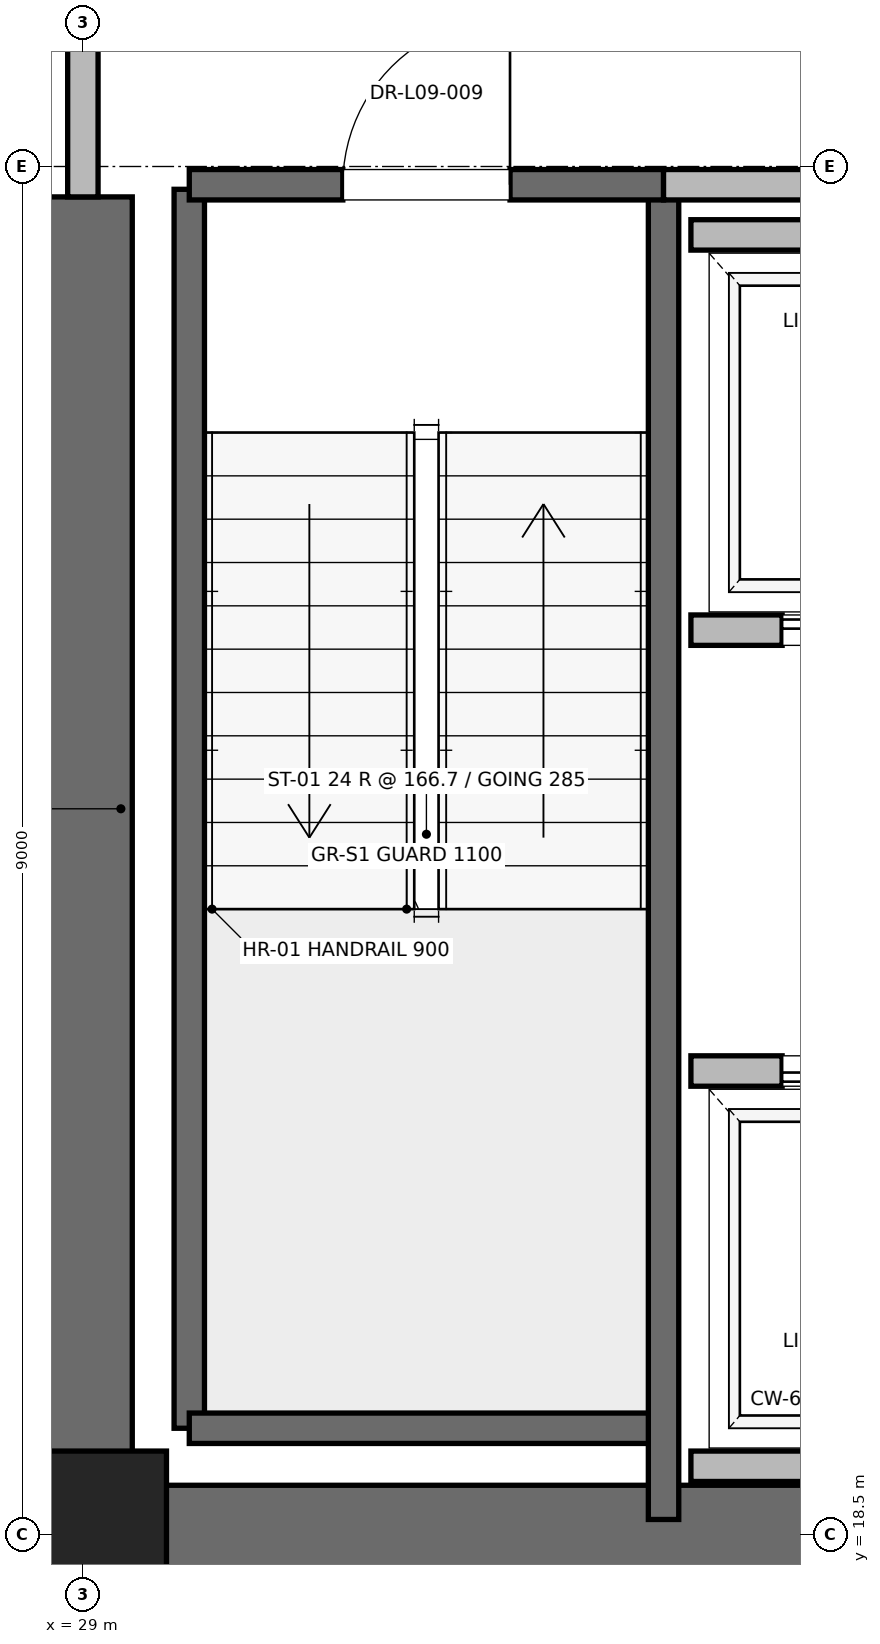
"""IFC4 building model, lengths in metres.
Left out: names, types, materials, properties, quantities, classifications, styles, units other than length and angle.
Written with IfcOpenShell. Run it as: python <this file> out.ifc"""

import sys

from ifc_helpers import new_model, si_unit, direction, frame, frame_2d, origin, origin_2d, place, context, subcontext, project, spatial, rectangle, extrude, element, fill, save


model = new_model("IFC4")
c1 = context("Model", 3, precision=1e-05, world=origin(), true_north=direction((0.0, 1.0)))
c2 = subcontext(c1, "Body", "Model", "MODEL_VIEW")
j1 = project(units=[si_unit("LENGTHUNIT", "METRE"), si_unit("PLANEANGLEUNIT", "RADIAN")], contexts=[c1])
p1 = place(None, origin())
s1 = spatial("IfcSite", under=j1, at=p1, CompositionType="ELEMENT")
p2 = place(p1, origin())
s2 = spatial("IfcBuilding", under=s1, at=p2, CompositionType="ELEMENT")
p3 = place(p2, frame((0.0, 0.0, 43.6)))
s3 = spatial("IfcBuildingStorey", under=s2, at=p3, CompositionType="ELEMENT", Elevation=43.6)
p4 = place(p3, frame((29.0, 18.5, 0.0), z_axis=(0.0, 0.0, 1.0), x_axis=(1.0, 0.0, 0.0)))
e1 = element("IfcColumn", 1, at=p4, inside=s3, PredefinedType="PILASTER", context=c2, shape_type="SweptSolid", body=[
    extrude(rectangle(XDim=1.1, YDim=1.1, at=origin_2d()), origin(), (0.0, 0.0, 1.0), 4.0),
])
p5 = place(p3, frame((29.0, 18.5, 0.0), z_axis=(0.0, 0.0, 1.0), x_axis=(1.0, 0.0, 0.0)))
e2 = element("IfcWall", 2, at=p5, inside=s3, PredefinedType="SHEAR", context=c2, shape_type="SweptSolid", body=[
    extrude(rectangle(XDim=9.2, YDim=0.65, at=frame_2d((4.6, 0.0))), origin(), (0.0, 0.0, 1.0), 3.76),
])
p6 = place(p3, frame((29.0, 18.5, 0.0), z_axis=(0.0, 0.0, 1.0), x_axis=(0.0, 1.0, 0.0)))
e3 = element("IfcWall", 3, at=p6, inside=s3, PredefinedType="SHEAR", context=c2, shape_type="SweptSolid", body=[
    extrude(rectangle(XDim=8.8, YDim=0.65, at=frame_2d((4.4, 0.0))), origin(), (0.0, 0.0, 1.0), 3.76),
])
p7 = place(p3, frame((29.7, 19.2, 0.0), z_axis=(0.0, 0.0, 1.0), x_axis=(0.0, 1.0, 0.0)))
e4 = element("IfcWall", 4, at=p7, inside=s3, PredefinedType="SOLIDWALL", context=c2, shape_type="SweptSolid", body=[
    extrude(rectangle(XDim=8.15, YDim=0.2, at=frame_2d((4.075, 0.0))), origin(), (0.0, 0.0, 1.0), 3.76),
])
p8 = place(p3, frame((29.7, 19.2, 0.0), z_axis=(0.0, 0.0, 1.0), x_axis=(1.0, 0.0, 0.0)))
e5 = element("IfcWall", 5, at=p8, inside=s3, PredefinedType="SOLIDWALL", context=c2, shape_type="SweptSolid", body=[
    extrude(rectangle(XDim=3.12, YDim=0.2, at=frame_2d((1.56, 0.0))), origin(), (0.0, 0.0, 1.0), 3.76),
])
p9 = place(p3, frame((32.82, 18.6, 0.0), z_axis=(0.0, 0.0, 1.0), x_axis=(0.0, 1.0, 0.0)))
e6 = element("IfcWall", 6, at=p9, inside=s3, PredefinedType="SOLIDWALL", context=c2, shape_type="SweptSolid", body=[
    extrude(rectangle(XDim=8.78, YDim=0.2, at=frame_2d((4.39, 0.0))), origin(), (0.0, 0.0, 1.0), 3.76),
])
p10 = place(p3, frame((29.7, 27.38, 0.0), z_axis=(0.0, 0.0, 1.0), x_axis=(1.0, 0.0, 0.0)))
e7 = element("IfcWall", 7, at=p10, inside=s3, PredefinedType="SOLIDWALL", context=c2, shape_type="SweptSolid", body=[
    extrude(rectangle(XDim=3.12, YDim=0.2, at=frame_2d((1.56, 0.0))), origin(), (0.0, 0.0, 1.0), 3.76),
])
p11 = place(p10, frame((1.01, 0.0, 0.0)))
e8 = element("IfcOpeningElement", 8, at=p11, cuts=e7, PredefinedType="OPENING", context=c2, shape_type="SweptSolid", body=[
    extrude(rectangle(XDim=1.1, YDim=2.15, at=frame_2d((0.55, 1.075))), frame((0.0, 0.1, 0.0), z_axis=(0.0, -1.0, 0.0), x_axis=(1.0, 0.0, 0.0)), (0.0, 0.0, 1.0), 0.2),
])
p12 = place(p3, frame((29.0, 27.3, 0.0), z_axis=(0.0, 0.0, 1.0), x_axis=(0.0, 1.0, 0.0)))
e9 = element("IfcWall", 9, at=p12, inside=s3, PredefinedType="PARTITIONING", context=c2, shape_type="SweptSolid", body=[
    extrude(rectangle(XDim=3.4, YDim=0.2, at=frame_2d((1.7, 0.0))), origin(), (0.0, 0.0, 1.0), 2.54),
])
p13 = place(p12, frame((1.125, 0.0, 0.0)))
e10 = element("IfcOpeningElement", 10, at=p13, cuts=e9, PredefinedType="OPENING", context=c2, shape_type="SweptSolid", body=[
    extrude(rectangle(XDim=1.15, YDim=2.2, at=frame_2d((0.575, 1.1))), frame((0.0, 0.1, 0.0), z_axis=(0.0, -1.0, 0.0), x_axis=(1.0, 0.0, 0.0)), (0.0, 0.0, 1.0), 0.2),
])
p14 = place(p3, frame((32.82, 27.38, 0.0), z_axis=(0.0, 0.0, 1.0), x_axis=(1.0, 0.0, 0.0)))
e11 = element("IfcWall", 11, at=p14, inside=s3, PredefinedType="PARTITIONING", context=c2, shape_type="SweptSolid", body=[
    extrude(rectangle(XDim=5.62, YDim=0.2, at=frame_2d((2.81, 0.0))), origin(), (0.0, 0.0, 1.0), 3.76),
])
p15 = place(p3, frame((33.0, 18.95, 0.0), z_axis=(0.0, 0.0, 1.0), x_axis=(1.0, 0.0, 0.0)))
e12 = element("IfcWall", 12, at=p15, inside=s3, PredefinedType="SOLIDWALL", context=c2, shape_type="SweptSolid", body=[
    extrude(rectangle(XDim=2.3, YDim=0.2, at=frame_2d((1.15, 0.0))), origin(), (0.0, 0.0, 1.0), 3.76),
])
p16 = place(p3, frame((35.3, 21.55, 0.0), z_axis=(0.0, 0.0, 1.0), x_axis=(-1.0, 0.0, 0.0)))
e13 = element("IfcWall", 13, at=p16, inside=s3, PredefinedType="SOLIDWALL", context=c2, shape_type="SweptSolid", body=[
    extrude(rectangle(XDim=2.3, YDim=0.2, at=frame_2d((1.15, 0.0))), origin(), (0.0, 0.0, 1.0), 3.76),
])
p17 = place(p16, frame((0.6, 0.0, 0.0)))
e14 = element("IfcOpeningElement", 14, at=p17, cuts=e13, PredefinedType="OPENING", context=c2, shape_type="SweptSolid", body=[
    extrude(rectangle(XDim=1.1, YDim=2.2, at=frame_2d((0.55, 1.1))), frame((0.0, 0.1, 0.0), z_axis=(0.0, -1.0, 0.0), x_axis=(1.0, 0.0, 0.0)), (0.0, 0.0, 1.0), 0.2),
])
p18 = place(p3, frame((33.0, 24.45, 0.0), z_axis=(0.0, 0.0, 1.0), x_axis=(1.0, 0.0, 0.0)))
e15 = element("IfcWall", 15, at=p18, inside=s3, PredefinedType="SOLIDWALL", context=c2, shape_type="SweptSolid", body=[
    extrude(rectangle(XDim=2.3, YDim=0.2, at=frame_2d((1.15, 0.0))), origin(), (0.0, 0.0, 1.0), 3.76),
])
p19 = place(p18, frame((0.6, 0.0, 0.0)))
e16 = element("IfcOpeningElement", 16, at=p19, cuts=e15, PredefinedType="OPENING", context=c2, shape_type="SweptSolid", body=[
    extrude(rectangle(XDim=1.1, YDim=2.2, at=frame_2d((0.55, 1.1))), frame((0.0, 0.1, 0.0), z_axis=(0.0, -1.0, 0.0), x_axis=(1.0, 0.0, 0.0)), (0.0, 0.0, 1.0), 0.2),
])
p20 = place(p3, frame((35.3, 27.05, 0.0), z_axis=(0.0, 0.0, 1.0), x_axis=(-1.0, 0.0, 0.0)))
e17 = element("IfcWall", 17, at=p20, inside=s3, PredefinedType="SOLIDWALL", context=c2, shape_type="SweptSolid", body=[
    extrude(rectangle(XDim=2.3, YDim=0.2, at=frame_2d((1.15, 0.0))), origin(), (0.0, 0.0, 1.0), 3.76),
])
p21 = place(p11, origin())
e18 = element("IfcDoor", 18, at=p21, inside=s3, OperationType="SINGLE_SWING_RIGHT", PredefinedType="DOOR", context=c2, shape_type="SweptSolid", body=[
    extrude(rectangle(XDim=1.1, YDim=2.15, at=frame_2d((0.55, 1.075))), frame((0.0, 0.025, 0.0), z_axis=(0.0, -1.0, 0.0), x_axis=(1.0, 0.0, 0.0)), (0.0, 0.0, 1.0), 0.05),
])
fill(e8, e18)
p22 = place(p17, origin())
e19 = element("IfcDoor", 19, at=p22, inside=s3, OperationType="SLIDING_TO_RIGHT", PredefinedType="DOOR", context=c2, shape_type="SweptSolid", body=[
    extrude(rectangle(XDim=1.1, YDim=2.2, at=frame_2d((0.55, 1.1))), frame((0.0, 0.025, 0.0), z_axis=(0.0, -1.0, 0.0), x_axis=(1.0, 0.0, 0.0)), (0.0, 0.0, 1.0), 0.05),
])
fill(e14, e19)
p23 = place(p19, origin())
e20 = element("IfcDoor", 20, at=p23, inside=s3, OperationType="SLIDING_TO_RIGHT", PredefinedType="DOOR", context=c2, shape_type="SweptSolid", body=[
    extrude(rectangle(XDim=1.1, YDim=2.2, at=frame_2d((0.55, 1.1))), frame((0.0, 0.025, 0.0), z_axis=(0.0, -1.0, 0.0), x_axis=(1.0, 0.0, 0.0)), (0.0, 0.0, 1.0), 0.05),
])
fill(e16, e20)
save(model, sys.argv[1])
